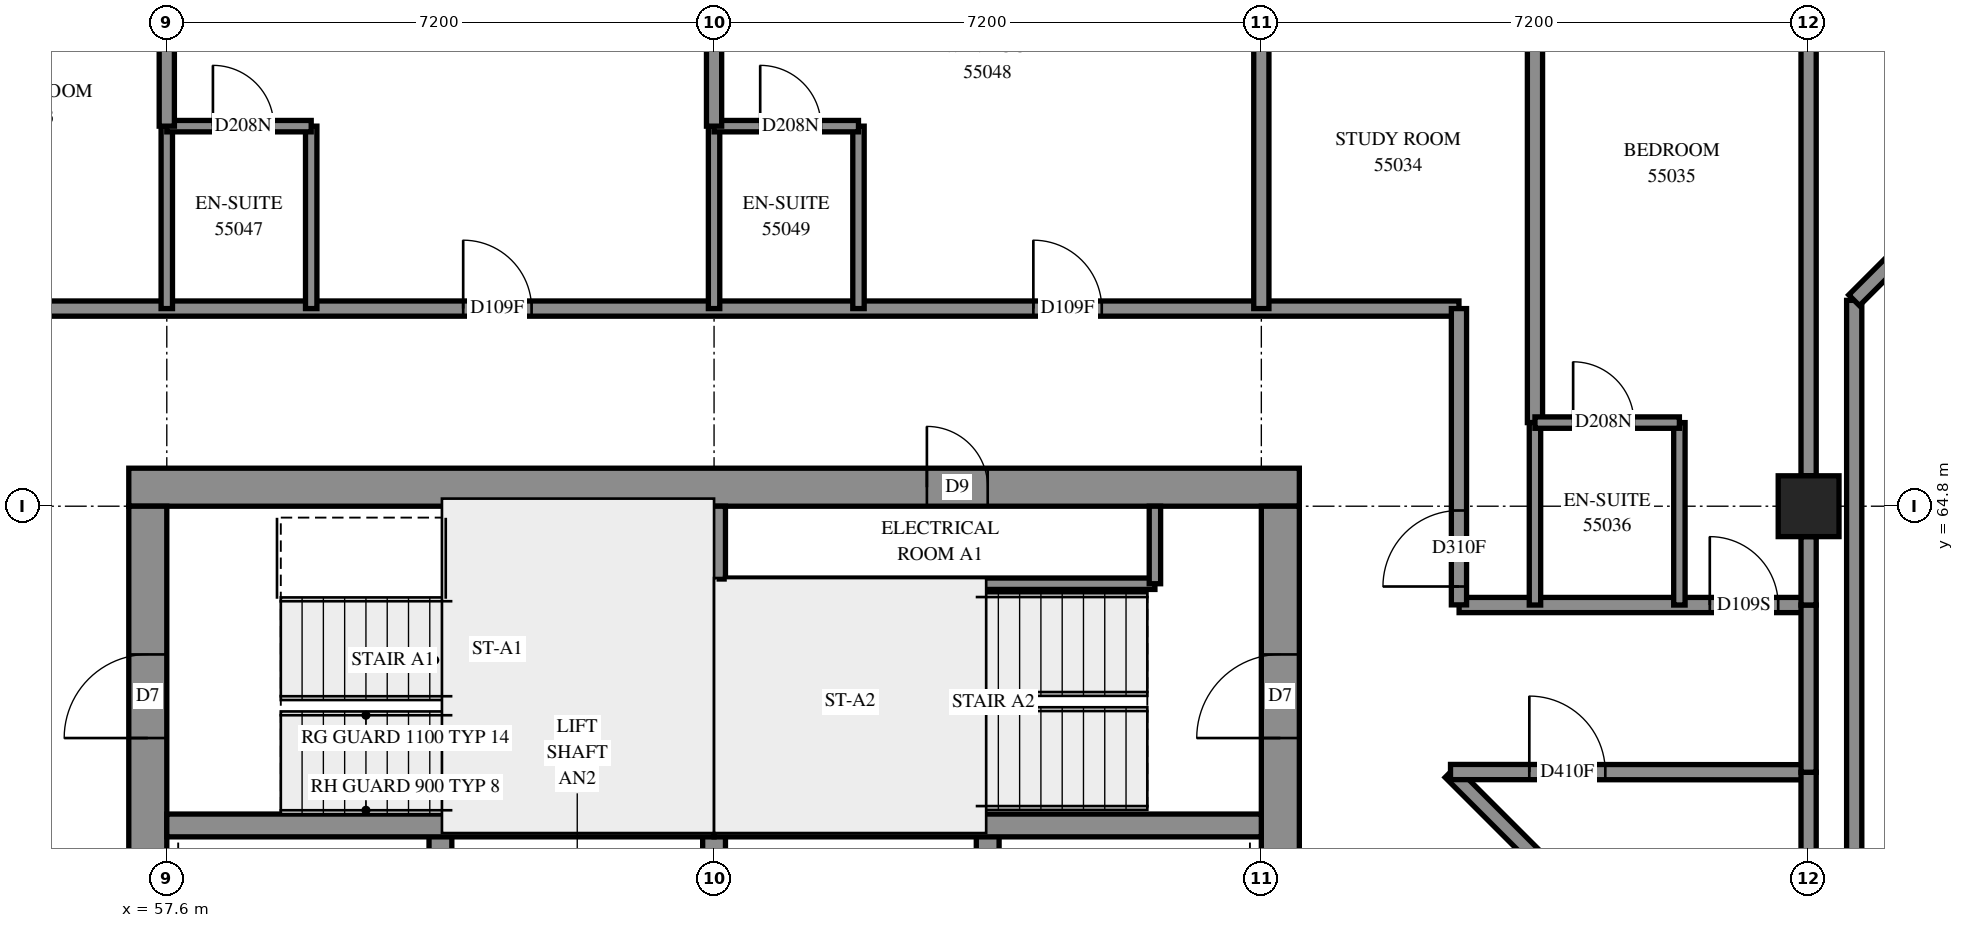
"""IFC4 building model, lengths in metres.
Left out: names, types, materials, properties, quantities, classifications, styles, units other than length and angle.
Written with IfcOpenShell. Run it as: python <this file> out.ifc"""

import sys

from ifc_helpers import new_model, si_unit, direction, frame, frame_2d, origin, origin_2d, place, context, subcontext, project, spatial, rectangle, extrude, element, fill, save


model = new_model("IFC4")
c1 = context("Model", 3, precision=1e-05, world=origin(), true_north=direction((0.0, 1.0)))
c2 = subcontext(c1, "Body", "Model", "MODEL_VIEW")
j1 = project(units=[si_unit("LENGTHUNIT", "METRE"), si_unit("PLANEANGLEUNIT", "RADIAN")], contexts=[c1])
p1 = place(None, origin())
s1 = spatial("IfcSite", under=j1, at=p1, CompositionType="ELEMENT")
p2 = place(p1, origin())
s2 = spatial("IfcBuilding", under=s1, at=p2, CompositionType="ELEMENT")
p3 = place(p2, frame((0.0, 0.0, 203.2)))
s3 = spatial("IfcBuildingStorey", under=s2, at=p3, CompositionType="ELEMENT", Elevation=203.2)
p4 = place(p3, frame((79.2, 64.8, 0.0), z_axis=(0.0, 0.0, 1.0), x_axis=(1.0, 0.0, 0.0)))
e1 = element("IfcColumn", 1, at=p4, inside=s3, PredefinedType="COLUMN", context=c2, shape_type="SweptSolid", body=[
    extrude(rectangle(XDim=0.8, YDim=0.8, at=origin_2d()), origin(), (0.0, 0.0, 1.0), 3.1),
])
p5 = place(p3, frame((57.1, 65.05, -0.3), z_axis=(0.0, 0.0, 1.0), x_axis=(1.0, 0.0, 0.0)))
e2 = element("IfcWall", 2, at=p5, inside=s3, PredefinedType="SHEAR", context=c2, shape_type="SweptSolid", body=[
    extrude(rectangle(XDim=15.4, YDim=0.5, at=frame_2d((7.7, 0.0))), origin(), (0.0, 0.0, 1.0), 2.7),
])
p6 = place(p5, frame((10.5, 0.0, 0.3)))
e3 = element("IfcOpeningElement", 3, at=p6, cuts=e2, PredefinedType="OPENING", context=c2, shape_type="SweptSolid", body=[
    extrude(rectangle(XDim=0.8, YDim=2.1, at=frame_2d((0.4, 1.05))), frame((0.0, 0.26, 0.0), z_axis=(0.0, -1.0, 0.0), x_axis=(1.0, 0.0, 0.0)), (0.0, 0.0, 1.0), 0.52),
])
p7 = place(p3, frame((57.35, 50.4, -0.3), z_axis=(0.0, 0.0, 1.0), x_axis=(0.0, 1.0, 0.0)))
e4 = element("IfcWall", 4, at=p7, inside=s3, PredefinedType="SHEAR", context=c2, shape_type="SweptSolid", body=[
    extrude(rectangle(XDim=14.4, YDim=0.5, at=frame_2d((7.2, 0.0))), origin(), (0.0, 0.0, 1.0), 2.7),
])
p8 = place(p7, frame((4.55, 0.0, 0.3)))
e5 = element("IfcOpeningElement", 5, at=p8, cuts=e4, PredefinedType="OPENING", context=c2, shape_type="SweptSolid", body=[
    extrude(rectangle(XDim=1.1, YDim=2.1, at=frame_2d((0.55, 1.05))), frame((0.0, 0.26, 0.0), z_axis=(0.0, -1.0, 0.0), x_axis=(1.0, 0.0, 0.0)), (0.0, 0.0, 1.0), 0.52),
])
p9 = place(p7, frame((11.35, 0.0, 0.3)))
e6 = element("IfcOpeningElement", 6, at=p9, cuts=e4, PredefinedType="OPENING", context=c2, shape_type="SweptSolid", body=[
    extrude(rectangle(XDim=1.1, YDim=2.1, at=frame_2d((0.55, 1.05))), frame((0.0, 0.26, 0.0), z_axis=(0.0, -1.0, 0.0), x_axis=(1.0, 0.0, 0.0)), (0.0, 0.0, 1.0), 0.52),
])
p10 = place(p3, frame((72.25, 50.4, -0.3), z_axis=(0.0, 0.0, 1.0), x_axis=(0.0, 1.0, 0.0)))
e7 = element("IfcWall", 7, at=p10, inside=s3, PredefinedType="SHEAR", context=c2, shape_type="SweptSolid", body=[
    extrude(rectangle(XDim=14.4, YDim=0.5, at=frame_2d((7.2, 0.0))), origin(), (0.0, 0.0, 1.0), 2.7),
])
p11 = place(p10, frame((4.55, 0.0, 0.3)))
e8 = element("IfcOpeningElement", 8, at=p11, cuts=e7, PredefinedType="OPENING", context=c2, shape_type="SweptSolid", body=[
    extrude(rectangle(XDim=1.1, YDim=2.1, at=frame_2d((0.55, 1.05))), frame((0.0, 0.26, 0.0), z_axis=(0.0, -1.0, 0.0), x_axis=(1.0, 0.0, 0.0)), (0.0, 0.0, 1.0), 0.52),
])
p12 = place(p10, frame((11.35, 0.0, 0.3)))
e9 = element("IfcOpeningElement", 9, at=p12, cuts=e7, PredefinedType="OPENING", context=c2, shape_type="SweptSolid", body=[
    extrude(rectangle(XDim=1.1, YDim=2.1, at=frame_2d((0.55, 1.05))), frame((0.0, 0.26, 0.0), z_axis=(0.0, -1.0, 0.0), x_axis=(1.0, 0.0, 0.0)), (0.0, 0.0, 1.0), 0.52),
])
for number, where, z_axis, x_axis in (
    (10, (61.2, 57.3, 0.0), (0.0, 0.0, 1.0), (0.0, 1.0, 0.0)),
    (11, (64.8, 57.3, 0.0), (0.0, 0.0, 1.0), (0.0, 1.0, 0.0)),
    (12, (68.4, 57.3, 0.0), (0.0, 0.0, 1.0), (0.0, 1.0, 0.0)),
):
    element("IfcWall", number, at=place(p3, frame(where, z_axis=z_axis, x_axis=x_axis)), inside=s3, PredefinedType="SOLIDWALL", context=c2, shape_type="SweptSolid", body=[
        extrude(rectangle(XDim=3.3, YDim=0.3, at=frame_2d((1.65, 0.0))), origin(), (0.0, 0.0, 1.0), 3.1),
    ])
for number, where, z_axis, x_axis in (
    (13, (57.6, 60.6, 0.0), (0.0, 0.0, 1.0), (1.0, 0.0, 0.0)),
    (14, (64.8, 60.6, 0.0), (0.0, 0.0, 1.0), (1.0, 0.0, 0.0)),
):
    element("IfcWall", number, at=place(p3, frame(where, z_axis=z_axis, x_axis=x_axis)), inside=s3, PredefinedType="SOLIDWALL", context=c2, shape_type="SweptSolid", body=[
        extrude(rectangle(XDim=7.2, YDim=0.3, at=frame_2d((3.6, 0.0))), origin(), (0.0, 0.0, 1.0), 3.1),
    ])
p13 = place(p3, frame((64.8, 60.6, 0.0), z_axis=(0.0, 0.0, 1.0), x_axis=(0.0, 1.0, 0.0)))
e15 = element("IfcWall", 15, at=p13, inside=s3, PredefinedType="SOLIDWALL", context=c2, shape_type="SweptSolid", body=[
    extrude(rectangle(XDim=4.2, YDim=0.3, at=frame_2d((2.1, 0.0))), origin(), (0.0, 0.0, 1.0), 3.1),
])
p14 = place(p3, frame((64.95, 63.78, 0.0), z_axis=(0.0, 0.0, 1.0), x_axis=(1.0, 0.0, 0.0)))
e16 = element("IfcWall", 16, at=p14, inside=s3, PredefinedType="PARTITIONING", context=c2, shape_type="SweptSolid", body=[
    extrude(rectangle(XDim=5.65, YDim=0.15, at=frame_2d((2.825, 0.0))), origin(), (0.0, 0.0, 1.0), 3.1),
])
p15 = place(p3, frame((70.6, 63.78, 0.0), z_axis=(0.0, 0.0, 1.0), x_axis=(0.0, 1.0, 0.0)))
e17 = element("IfcWall", 17, at=p15, inside=s3, PredefinedType="PARTITIONING", context=c2, shape_type="SweptSolid", body=[
    extrude(rectangle(XDim=1.02, YDim=0.15, at=frame_2d((0.51, 0.0))), origin(), (0.0, 0.0, 1.0), 3.1),
])
p16 = place(p3, frame((55.0, 67.4, 0.0), z_axis=(0.0, 0.0, 1.0), x_axis=(1.0, 0.0, 0.0)))
e18 = element("IfcWall", 18, at=p16, inside=s3, PredefinedType="PARTITIONING", context=c2, shape_type="SweptSolid", body=[
    extrude(rectangle(XDim=19.6, YDim=0.2, at=frame_2d((9.8, 0.0))), origin(), (0.0, 0.0, 1.0), 3.1),
])
p17 = place(p16, frame((6.499, 0.0, 0.0)))
e19 = element("IfcOpeningElement", 19, at=p17, cuts=e18, PredefinedType="OPENING", context=c2, shape_type="SweptSolid", body=[
    extrude(rectangle(XDim=0.9, YDim=2.1, at=frame_2d((0.45, 1.05))), frame((0.0, 0.11, 0.0), z_axis=(0.0, -1.0, 0.0), x_axis=(1.0, 0.0, 0.0)), (0.0, 0.0, 1.0), 0.22),
])
p18 = place(p16, frame((14.001, 0.0, 0.0)))
e20 = element("IfcOpeningElement", 20, at=p18, cuts=e18, PredefinedType="OPENING", context=c2, shape_type="SweptSolid", body=[
    extrude(rectangle(XDim=0.9, YDim=2.1, at=frame_2d((0.45, 1.05))), frame((0.0, 0.11, 0.0), z_axis=(0.0, -1.0, 0.0), x_axis=(1.0, 0.0, 0.0)), (0.0, 0.0, 1.0), 0.22),
])
p19 = place(p3, frame((79.8, 55.986, 0.0), z_axis=(0.0, 0.0, 1.0), x_axis=(0.0, 1.0, 0.0)))
e21 = element("IfcWall", 21, at=p19, inside=s3, PredefinedType="PARTITIONING", context=c2, shape_type="SweptSolid", body=[
    extrude(rectangle(XDim=11.522, YDim=0.2, at=frame_2d((5.761, 0.0))), origin(), (0.0, 0.0, 1.0), 3.1),
])
p20 = place(p3, frame((79.837, 55.951, 0.0), z_axis=(0.0, 0.0, 1.0), x_axis=(0.7071067812, 0.7071067812, 0.0)))
e22 = element("IfcWall", 22, at=p20, inside=s3, PredefinedType="PARTITIONING", context=c2, shape_type="SweptSolid", body=[
    extrude(rectangle(XDim=9.897, YDim=0.2, at=frame_2d((4.948, 0.0))), origin(), (0.0, 0.0, 1.0), 3.1),
])
p21 = place(p20, frame((0.873, 0.0, 0.0)))
e23 = element("IfcOpeningElement", 23, at=p21, cuts=e22, PredefinedType="OPENING", context=c2, shape_type="SweptSolid", body=[
    extrude(rectangle(XDim=1.0, YDim=2.1, at=frame_2d((0.5, 1.05))), frame((0.0, 0.11, 0.0), z_axis=(0.0, -1.0, 0.0), x_axis=(1.0, 0.0, 0.0)), (0.0, 0.0, 1.0), 0.22),
])
p22 = place(p3, frame((75.6, 65.9, 0.0), z_axis=(0.0, 0.0, 1.0), x_axis=(0.0, 1.0, 0.0)))
e24 = element("IfcWall", 24, at=p22, inside=s3, PredefinedType="PARTITIONING", context=c2, shape_type="SweptSolid", body=[
    extrude(rectangle(XDim=6.877, YDim=0.2, at=frame_2d((3.439, 0.0))), origin(), (0.0, 0.0, 1.0), 3.1),
])
p23 = place(p3, frame((74.489, 61.303, 0.0), z_axis=(0.0, 0.0, 1.0), x_axis=(0.7071892763, -0.7070242765, 0.0)))
e25 = element("IfcWall", 25, at=p23, inside=s3, PredefinedType="PARTITIONING", context=c2, shape_type="SweptSolid", body=[
    extrude(rectangle(XDim=6.667, YDim=0.2, at=frame_2d((3.333, 0.0))), origin(), (0.0, 0.0, 1.0), 3.1),
])
p24 = place(p3, frame((79.2, 65.2, 0.0), z_axis=(0.0, 0.0, 1.0), x_axis=(0.0, 1.0, 0.0)))
e26 = element("IfcWall", 26, at=p24, inside=s3, PredefinedType="PARTITIONING", context=c2, shape_type="SweptSolid", body=[
    extrude(rectangle(XDim=6.4, YDim=0.2, at=frame_2d((3.2, 0.0))), origin(), (0.0, 0.0, 1.0), 3.1),
])
p25 = place(p3, frame((74.489, 61.303, 0.0), z_axis=(0.0, 0.0, 1.0), x_axis=(0.9999998105, -0.0006155543, 0.0)))
e27 = element("IfcWall", 27, at=p25, inside=s3, PredefinedType="PARTITIONING", context=c2, shape_type="SweptSolid", body=[
    extrude(rectangle(XDim=4.711, YDim=0.2, at=frame_2d((2.356, 0.0))), origin(), (0.0, 0.0, 1.0), 3.1),
])
p26 = place(p25, frame((1.037, 0.0, 0.0)))
e28 = element("IfcOpeningElement", 28, at=p26, cuts=e27, PredefinedType="OPENING", context=c2, shape_type="SweptSolid", body=[
    extrude(rectangle(XDim=1.0, YDim=2.1, at=frame_2d((0.5, 1.05))), frame((0.0, 0.11, 0.0), z_axis=(0.0, -1.0, 0.0), x_axis=(1.0, 0.0, 0.0)), (0.0, 0.0, 1.0), 0.22),
])
p27 = place(p3, frame((74.602, 63.5, 0.0), z_axis=(0.0, 0.0, 1.0), x_axis=(1.0, 0.0, 0.0)))
e29 = element("IfcWall", 29, at=p27, inside=s3, PredefinedType="PARTITIONING", context=c2, shape_type="SweptSolid", body=[
    extrude(rectangle(XDim=4.598, YDim=0.2, at=frame_2d((2.299, 0.0))), origin(), (0.0, 0.0, 1.0), 3.1),
])
p28 = place(p27, frame((3.298, 0.0, 0.0)))
e30 = element("IfcOpeningElement", 30, at=p28, cuts=e29, PredefinedType="OPENING", context=c2, shape_type="SweptSolid", body=[
    extrude(rectangle(XDim=0.9, YDim=2.1, at=frame_2d((0.45, 1.05))), frame((0.0, 0.11, 0.0), z_axis=(0.0, -1.0, 0.0), x_axis=(1.0, 0.0, 0.0)), (0.0, 0.0, 1.0), 0.22),
])
p29 = place(p3, frame((72.0, 67.4, 0.0), z_axis=(0.0, 0.0, 1.0), x_axis=(0.0, 1.0, 0.0)))
e31 = element("IfcWall", 31, at=p29, inside=s3, PredefinedType="PARTITIONING", context=c2, shape_type="SweptSolid", body=[
    extrude(rectangle(XDim=4.096, YDim=0.2, at=frame_2d((2.048, 0.0))), origin(), (0.0, 0.0, 1.0), 3.1),
])
p30 = place(p3, frame((74.6, 63.502, 0.0), z_axis=(0.0, 0.0, 1.0), x_axis=(0.0, 1.0, 0.0)))
e32 = element("IfcWall", 32, at=p30, inside=s3, PredefinedType="PARTITIONING", context=c2, shape_type="SweptSolid", body=[
    extrude(rectangle(XDim=3.898, YDim=0.2, at=frame_2d((1.949, 0.0))), origin(), (0.0, 0.0, 1.0), 3.1),
])
p31 = place(p30, frame((0.242, 0.0, 0.0)))
e33 = element("IfcOpeningElement", 33, at=p31, cuts=e32, PredefinedType="OPENING", context=c2, shape_type="SweptSolid", body=[
    extrude(rectangle(XDim=1.0, YDim=2.1, at=frame_2d((0.5, 1.05))), frame((0.0, 0.11, 0.0), z_axis=(0.0, -1.0, 0.0), x_axis=(1.0, 0.0, 0.0)), (0.0, 0.0, 1.0), 0.22),
])
p32 = place(p3, frame((79.799, 67.509, 0.0), z_axis=(0.0, 0.0, 1.0), x_axis=(0.7070928849, 0.7071206772, 0.0)))
e34 = element("IfcWall", 34, at=p32, inside=s3, PredefinedType="PARTITIONING", context=c2, shape_type="SweptSolid", body=[
    extrude(rectangle(XDim=3.598, YDim=0.2, at=frame_2d((1.799, 0.0))), origin(), (0.0, 0.0, 1.0), 3.1),
])
p33 = place(p3, frame((79.2, 58.0, 0.0), z_axis=(0.0, 0.0, 1.0), x_axis=(0.0, 1.0, 0.0)))
e35 = element("IfcWall", 35, at=p33, inside=s3, PredefinedType="PARTITIONING", context=c2, shape_type="SweptSolid", body=[
    extrude(rectangle(XDim=3.3, YDim=0.2, at=frame_2d((1.65, 0.0))), origin(), (0.0, 0.0, 1.0), 3.1),
])
for number, where, z_axis, x_axis in (
    (36, (75.6, 63.5, 0.0), (0.0, 0.0, 1.0), (0.0, 1.0, 0.0)),
    (37, (77.5, 63.5, 0.0), (0.0, 0.0, 1.0), (0.0, 1.0, 0.0)),
    (38, (59.5, 67.4, 0.0), (0.0, 0.0, 1.0), (0.0, 1.0, 0.0)),
    (39, (57.6, 67.4, 0.0), (0.0, 0.0, 1.0), (0.0, 1.0, 0.0)),
    (40, (66.7, 67.4, 0.0), (0.0, 0.0, 1.0), (0.0, 1.0, 0.0)),
    (41, (64.8, 67.4, 0.0), (0.0, 0.0, 1.0), (0.0, 1.0, 0.0)),
):
    element("IfcWall", number, at=place(p3, frame(where, z_axis=z_axis, x_axis=x_axis)), inside=s3, PredefinedType="PARTITIONING", context=c2, shape_type="SweptSolid", body=[
        extrude(rectangle(XDim=2.4, YDim=0.15, at=frame_2d((1.2, 0.0))), origin(), (0.0, 0.0, 1.0), 3.1),
    ])
p34 = place(p3, frame((79.2, 61.3, 0.0), z_axis=(0.0, 0.0, 1.0), x_axis=(0.0, 1.0, 0.0)))
e42 = element("IfcWall", 42, at=p34, inside=s3, PredefinedType="PARTITIONING", context=c2, shape_type="SweptSolid", body=[
    extrude(rectangle(XDim=2.2, YDim=0.2, at=frame_2d((1.1, 0.0))), origin(), (0.0, 0.0, 1.0), 3.1),
])
p35 = place(p3, frame((75.6, 65.9, 0.0), z_axis=(0.0, 0.0, 1.0), x_axis=(1.0, 0.0, 0.0)))
e43 = element("IfcWall", 43, at=p35, inside=s3, PredefinedType="PARTITIONING", context=c2, shape_type="SweptSolid", body=[
    extrude(rectangle(XDim=1.9, YDim=0.15, at=frame_2d((0.95, 0.0))), origin(), (0.0, 0.0, 1.0), 3.1),
])
p36 = place(p35, frame((0.502, 0.0, 0.0)))
e44 = element("IfcOpeningElement", 44, at=p36, cuts=e43, PredefinedType="OPENING", context=c2, shape_type="SweptSolid", body=[
    extrude(rectangle(XDim=0.8, YDim=2.1, at=frame_2d((0.4, 1.05))), frame((0.0, 0.085, 0.0), z_axis=(0.0, -1.0, 0.0), x_axis=(1.0, 0.0, 0.0)), (0.0, 0.0, 1.0), 0.17),
])
p37 = place(p3, frame((64.8, 69.8, 0.0), z_axis=(0.0, 0.0, 1.0), x_axis=(1.0, 0.0, 0.0)))
e45 = element("IfcWall", 45, at=p37, inside=s3, PredefinedType="PARTITIONING", context=c2, shape_type="SweptSolid", body=[
    extrude(rectangle(XDim=1.9, YDim=0.15, at=frame_2d((0.95, 0.0))), origin(), (0.0, 0.0, 1.0), 3.1),
])
p38 = place(p37, frame((0.607, 0.0, 0.0)))
e46 = element("IfcOpeningElement", 46, at=p38, cuts=e45, PredefinedType="OPENING", context=c2, shape_type="SweptSolid", body=[
    extrude(rectangle(XDim=0.8, YDim=2.1, at=frame_2d((0.4, 1.05))), frame((0.0, 0.085, 0.0), z_axis=(0.0, -1.0, 0.0), x_axis=(1.0, 0.0, 0.0)), (0.0, 0.0, 1.0), 0.17),
])
p39 = place(p3, frame((57.6, 69.8, 0.0), z_axis=(0.0, 0.0, 1.0), x_axis=(1.0, 0.0, 0.0)))
e47 = element("IfcWall", 47, at=p39, inside=s3, PredefinedType="PARTITIONING", context=c2, shape_type="SweptSolid", body=[
    extrude(rectangle(XDim=1.9, YDim=0.15, at=frame_2d((0.95, 0.0))), origin(), (0.0, 0.0, 1.0), 3.1),
])
p40 = place(p39, frame((0.607, 0.0, 0.0)))
e48 = element("IfcOpeningElement", 48, at=p40, cuts=e47, PredefinedType="OPENING", context=c2, shape_type="SweptSolid", body=[
    extrude(rectangle(XDim=0.8, YDim=2.1, at=frame_2d((0.4, 1.05))), frame((0.0, 0.085, 0.0), z_axis=(0.0, -1.0, 0.0), x_axis=(1.0, 0.0, 0.0)), (0.0, 0.0, 1.0), 0.17),
])
for number, where, z_axis, x_axis in (
    (49, (57.6, 69.8, 0.0), (0.0, 0.0, 1.0), (0.0, 1.0, 0.0)),
    (50, (64.8, 69.8, 0.0), (0.0, 0.0, 1.0), (0.0, 1.0, 0.0)),
):
    element("IfcWall", number, at=place(p3, frame(where, z_axis=z_axis, x_axis=x_axis)), inside=s3, PredefinedType="PARTITIONING", context=c2, shape_type="SweptSolid", body=[
        extrude(rectangle(XDim=1.8, YDim=0.2, at=frame_2d((0.9, 0.0))), origin(), (0.0, 0.0, 1.0), 3.1),
    ])
p41 = place(p3, frame((79.2, 63.5, 0.0), z_axis=(0.0, 0.0, 1.0), x_axis=(0.0, 1.0, 0.0)))
e51 = element("IfcWall", 51, at=p41, inside=s3, PredefinedType="PARTITIONING", context=c2, shape_type="SweptSolid", body=[
    extrude(rectangle(XDim=0.9, YDim=0.2, at=frame_2d((0.45, 0.0))), origin(), (0.0, 0.0, 1.0), 3.1),
])
p42 = place(p6, origin())
e52 = element("IfcDoor", 52, at=p42, inside=s3, OperationType="SINGLE_SWING_RIGHT", PredefinedType="DOOR", context=c2, shape_type="SweptSolid", body=[
    extrude(rectangle(XDim=0.8, YDim=2.1, at=frame_2d((0.4, 1.05))), frame((0.0, 0.025, 0.0), z_axis=(0.0, -1.0, 0.0), x_axis=(1.0, 0.0, 0.0)), (0.0, 0.0, 1.0), 0.05),
])
fill(e3, e52)
p43 = place(p9, origin())
e53 = element("IfcDoor", 53, at=p43, inside=s3, OperationType="SINGLE_SWING_LEFT", PredefinedType="DOOR", context=c2, shape_type="SweptSolid", body=[
    extrude(rectangle(XDim=1.1, YDim=2.1, at=frame_2d((0.55, 1.05))), frame((0.0, 0.025, 0.0), z_axis=(0.0, -1.0, 0.0), x_axis=(1.0, 0.0, 0.0)), (0.0, 0.0, 1.0), 0.05),
])
fill(e6, e53)
p44 = place(p12, origin())
e54 = element("IfcDoor", 54, at=p44, inside=s3, OperationType="SINGLE_SWING_RIGHT", PredefinedType="DOOR", context=c2, shape_type="SweptSolid", body=[
    extrude(rectangle(XDim=1.1, YDim=2.1, at=frame_2d((0.55, 1.05))), frame((0.0, 0.025, 0.0), z_axis=(0.0, -1.0, 0.0), x_axis=(1.0, 0.0, 0.0)), (0.0, 0.0, 1.0), 0.05),
])
fill(e9, e54)
p45 = place(p31, origin())
e55 = element("IfcDoor", 55, at=p45, inside=s3, OperationType="SINGLE_SWING_RIGHT", PredefinedType="DOOR", context=c2, shape_type="SweptSolid", body=[
    extrude(rectangle(XDim=1.0, YDim=2.1, at=frame_2d((0.5, 1.05))), frame((0.0, 0.025, 0.0), z_axis=(0.0, -1.0, 0.0), x_axis=(1.0, 0.0, 0.0)), (0.0, 0.0, 1.0), 0.05),
])
fill(e33, e55)
p46 = place(p28, origin())
e56 = element("IfcDoor", 56, at=p46, inside=s3, OperationType="SINGLE_SWING_LEFT", PredefinedType="DOOR", context=c2, shape_type="SweptSolid", body=[
    extrude(rectangle(XDim=0.9, YDim=2.1, at=frame_2d((0.45, 1.05))), frame((0.0, 0.025, 0.0), z_axis=(0.0, -1.0, 0.0), x_axis=(1.0, 0.0, 0.0)), (0.0, 0.0, 1.0), 0.05),
])
fill(e30, e56)
p47 = place(p36, origin())
e57 = element("IfcDoor", 57, at=p47, inside=s3, OperationType="SINGLE_SWING_RIGHT", PredefinedType="DOOR", context=c2, shape_type="SweptSolid", body=[
    extrude(rectangle(XDim=0.8, YDim=2.1, at=frame_2d((0.4, 1.05))), frame((0.0, 0.025, 0.0), z_axis=(0.0, -1.0, 0.0), x_axis=(1.0, 0.0, 0.0)), (0.0, 0.0, 1.0), 0.05),
])
fill(e44, e57)
p48 = place(p26, origin())
e58 = element("IfcDoor", 58, at=p48, inside=s3, OperationType="SINGLE_SWING_RIGHT", PredefinedType="DOOR", context=c2, shape_type="SweptSolid", body=[
    extrude(rectangle(XDim=1.0, YDim=2.1, at=frame_2d((0.5, 1.05))), frame((0.0, 0.025, 0.0), z_axis=(0.0, -1.0, 0.0), x_axis=(1.0, 0.0, 0.0)), (0.0, 0.0, 1.0), 0.05),
])
fill(e28, e58)
p49 = place(p17, origin())
e59 = element("IfcDoor", 59, at=p49, inside=s3, OperationType="SINGLE_SWING_RIGHT", PredefinedType="DOOR", context=c2, shape_type="SweptSolid", body=[
    extrude(rectangle(XDim=0.9, YDim=2.1, at=frame_2d((0.45, 1.05))), frame((0.0, 0.025, 0.0), z_axis=(0.0, -1.0, 0.0), x_axis=(1.0, 0.0, 0.0)), (0.0, 0.0, 1.0), 0.05),
])
fill(e19, e59)
p50 = place(p40, origin())
e60 = element("IfcDoor", 60, at=p50, inside=s3, OperationType="SINGLE_SWING_RIGHT", PredefinedType="DOOR", context=c2, shape_type="SweptSolid", body=[
    extrude(rectangle(XDim=0.8, YDim=2.1, at=frame_2d((0.4, 1.05))), frame((0.0, 0.025, 0.0), z_axis=(0.0, -1.0, 0.0), x_axis=(1.0, 0.0, 0.0)), (0.0, 0.0, 1.0), 0.05),
])
fill(e48, e60)
p51 = place(p18, origin())
e61 = element("IfcDoor", 61, at=p51, inside=s3, OperationType="SINGLE_SWING_RIGHT", PredefinedType="DOOR", context=c2, shape_type="SweptSolid", body=[
    extrude(rectangle(XDim=0.9, YDim=2.1, at=frame_2d((0.45, 1.05))), frame((0.0, 0.025, 0.0), z_axis=(0.0, -1.0, 0.0), x_axis=(1.0, 0.0, 0.0)), (0.0, 0.0, 1.0), 0.05),
])
fill(e20, e61)
p52 = place(p38, origin())
e62 = element("IfcDoor", 62, at=p52, inside=s3, OperationType="SINGLE_SWING_RIGHT", PredefinedType="DOOR", context=c2, shape_type="SweptSolid", body=[
    extrude(rectangle(XDim=0.8, YDim=2.1, at=frame_2d((0.4, 1.05))), frame((0.0, 0.025, 0.0), z_axis=(0.0, -1.0, 0.0), x_axis=(1.0, 0.0, 0.0)), (0.0, 0.0, 1.0), 0.05),
])
fill(e46, e62)
save(model, sys.argv[1])
